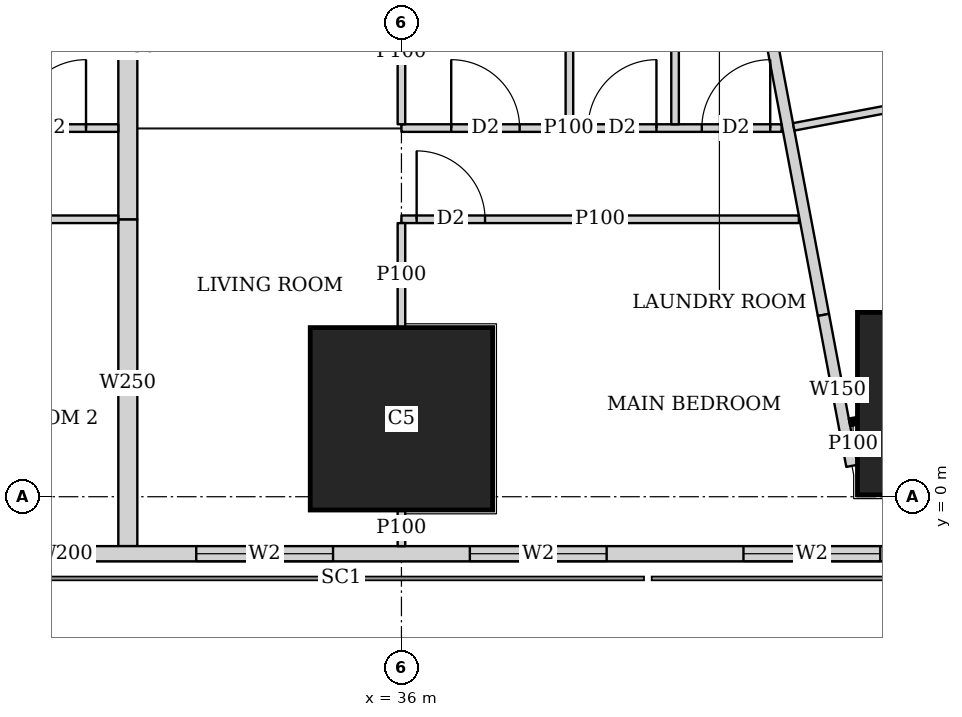
"""IFC4 building model, lengths in metres.
Left out: names, types, materials, properties, quantities, classifications, styles, units other than length and angle.
Written with IfcOpenShell. Run it as: python <this file> out.ifc"""

import sys

from ifc_helpers import new_model, si_unit, direction, frame, frame_2d, origin, origin_2d, place, context, subcontext, project, spatial, rectangle, extrude, element, fill, save


model = new_model("IFC4")
c1 = context("Model", 3, precision=1e-05, world=origin(), true_north=direction((0.0, 1.0)))
c2 = subcontext(c1, "Body", "Model", "MODEL_VIEW")
j1 = project(units=[si_unit("LENGTHUNIT", "METRE"), si_unit("PLANEANGLEUNIT", "RADIAN")], contexts=[c1])
p1 = place(None, origin())
s1 = spatial("IfcSite", under=j1, at=p1, CompositionType="ELEMENT")
p2 = place(p1, origin())
s2 = spatial("IfcBuilding", under=s1, at=p2, CompositionType="ELEMENT")
p3 = place(p2, frame((0.0, 0.0, 242.45)))
s3 = spatial("IfcBuildingStorey", under=s2, at=p3, CompositionType="ELEMENT", Elevation=242.45)
for number, where, z_axis, x_axis in (
    (1, (36.0, 1.025, 0.0), (0.0, 0.0, 1.0), (1.0, 0.0, 0.0)),
    (2, (43.2, 1.225, 0.0), (0.0, 0.0, 1.0), (1.0, 0.0, 0.0)),
):
    element("IfcColumn", number, at=place(p3, frame(where, z_axis=z_axis, x_axis=x_axis)), inside=s3, PredefinedType="COLUMN", context=c2, shape_type="SweptSolid", body=[
        extrude(rectangle(XDim=2.4, YDim=2.4, at=origin_2d()), origin(), (0.0, 0.0, 1.0), 3.75),
    ])
p4 = place(p3, frame((14.563, -0.75, 0.0), z_axis=(0.0, 0.0, 1.0), x_axis=(1.0, 0.0, 0.0)))
e3 = element("IfcWall", 3, at=p4, inside=s3, PredefinedType="SOLIDWALL", context=c2, shape_type="SweptSolid", body=[
    extrude(rectangle(XDim=33.228, YDim=0.2, at=frame_2d((16.614, 0.0))), origin(), (0.0, 0.0, 1.0), 3.45),
])
p5 = place(p4, frame((2.319, 0.0, 0.9)))
e4 = element("IfcOpeningElement", 4, at=p5, cuts=e3, PredefinedType="OPENING", context=c2, shape_type="SweptSolid", body=[
    extrude(rectangle(XDim=2.4, YDim=1.5, at=frame_2d((1.2, 0.75))), frame((0.0, 0.11, 0.0), z_axis=(0.0, -1.0, 0.0), x_axis=(1.0, 0.0, 0.0)), (0.0, 0.0, 1.0), 0.22),
])
p6 = place(p4, frame((7.937, 0.0, 0.9)))
e5 = element("IfcOpeningElement", 5, at=p6, cuts=e3, PredefinedType="OPENING", context=c2, shape_type="SweptSolid", body=[
    extrude(rectangle(XDim=1.8, YDim=1.5, at=frame_2d((0.9, 0.75))), frame((0.0, 0.11, 0.0), z_axis=(0.0, -1.0, 0.0), x_axis=(1.0, 0.0, 0.0)), (0.0, 0.0, 1.0), 0.22),
])
p7 = place(p4, frame((11.537, 0.0, 0.9)))
e6 = element("IfcOpeningElement", 6, at=p7, cuts=e3, PredefinedType="OPENING", context=c2, shape_type="SweptSolid", body=[
    extrude(rectangle(XDim=1.8, YDim=1.5, at=frame_2d((0.9, 0.75))), frame((0.0, 0.11, 0.0), z_axis=(0.0, -1.0, 0.0), x_axis=(1.0, 0.0, 0.0)), (0.0, 0.0, 1.0), 0.22),
])
p8 = place(p4, frame((15.137, 0.0, 0.9)))
e7 = element("IfcOpeningElement", 7, at=p8, cuts=e3, PredefinedType="OPENING", context=c2, shape_type="SweptSolid", body=[
    extrude(rectangle(XDim=1.8, YDim=1.5, at=frame_2d((0.9, 0.75))), frame((0.0, 0.11, 0.0), z_axis=(0.0, -1.0, 0.0), x_axis=(1.0, 0.0, 0.0)), (0.0, 0.0, 1.0), 0.22),
])
p9 = place(p4, frame((18.737, 0.0, 0.9)))
e8 = element("IfcOpeningElement", 8, at=p9, cuts=e3, PredefinedType="OPENING", context=c2, shape_type="SweptSolid", body=[
    extrude(rectangle(XDim=1.8, YDim=1.5, at=frame_2d((0.9, 0.75))), frame((0.0, 0.11, 0.0), z_axis=(0.0, -1.0, 0.0), x_axis=(1.0, 0.0, 0.0)), (0.0, 0.0, 1.0), 0.22),
])
p10 = place(p4, frame((22.337, 0.0, 0.9)))
e9 = element("IfcOpeningElement", 9, at=p10, cuts=e3, PredefinedType="OPENING", context=c2, shape_type="SweptSolid", body=[
    extrude(rectangle(XDim=1.8, YDim=1.5, at=frame_2d((0.9, 0.75))), frame((0.0, 0.11, 0.0), z_axis=(0.0, -1.0, 0.0), x_axis=(1.0, 0.0, 0.0)), (0.0, 0.0, 1.0), 0.22),
])
p11 = place(p4, frame((25.937, 0.0, 0.9)))
e10 = element("IfcOpeningElement", 10, at=p11, cuts=e3, PredefinedType="OPENING", context=c2, shape_type="SweptSolid", body=[
    extrude(rectangle(XDim=1.8, YDim=1.5, at=frame_2d((0.9, 0.75))), frame((0.0, 0.11, 0.0), z_axis=(0.0, -1.0, 0.0), x_axis=(1.0, 0.0, 0.0)), (0.0, 0.0, 1.0), 0.22),
])
p12 = place(p3, frame((33.933, 42.73, 0.0), z_axis=(0.0, 0.0, 1.0), x_axis=(0.185595417643, -0.982626246825, 0.0)))
e11 = element("IfcWall", 11, at=p12, inside=s3, PredefinedType="SOLIDWALL", context=c2, shape_type="SweptSolid", body=[
    extrude(rectangle(XDim=41.051, YDim=0.15, at=frame_2d((20.525, 0.0))), origin(), (0.0, 0.0, 1.0), 2.45),
])
p13 = place(p12, frame((12.266, 0.0, 0.0)))
e12 = element("IfcOpeningElement", 12, at=p13, cuts=e11, PredefinedType="OPENING", context=c2, shape_type="SweptSolid", body=[
    extrude(rectangle(XDim=1.0, YDim=2.1, at=frame_2d((0.5, 1.05))), frame((0.0, 0.085, 0.0), z_axis=(0.0, -1.0, 0.0), x_axis=(1.0, 0.0, 0.0)), (0.0, 0.0, 1.0), 0.17),
])
p14 = place(p12, frame((16.082, 0.0, 0.0)))
e13 = element("IfcOpeningElement", 13, at=p14, cuts=e11, PredefinedType="OPENING", context=c2, shape_type="SweptSolid", body=[
    extrude(rectangle(XDim=1.0, YDim=2.1, at=frame_2d((0.5, 1.05))), frame((0.0, 0.085, 0.0), z_axis=(0.0, -1.0, 0.0), x_axis=(1.0, 0.0, 0.0)), (0.0, 0.0, 1.0), 0.17),
])
p15 = place(p12, frame((30.862, 0.0, 0.0)))
e14 = element("IfcOpeningElement", 14, at=p15, cuts=e11, PredefinedType="OPENING", context=c2, shape_type="SweptSolid", body=[
    extrude(rectangle(XDim=1.0, YDim=2.1, at=frame_2d((0.5, 1.05))), frame((0.0, 0.085, 0.0), z_axis=(0.0, -1.0, 0.0), x_axis=(1.0, 0.0, 0.0)), (0.0, 0.0, 1.0), 0.17),
])
p16 = place(p3, frame((41.552, 2.392, 0.0), z_axis=(0.0, 0.0, 1.0), x_axis=(0.185535500323, -0.982637561932, 0.0)))
e15 = element("IfcWall", 15, at=p16, inside=s3, PredefinedType="SOLIDWALL", context=c2, shape_type="SweptSolid", body=[
    extrude(rectangle(XDim=2.021, YDim=0.15, at=frame_2d((1.011, 0.0))), origin(), (0.0, 0.0, 1.0), 2.0),
])
p17 = place(p3, frame((32.275, 3.65, 0.0), z_axis=(0.0, 0.0, 1.0), x_axis=(-1.0, 0.0, 0.0)))
e16 = element("IfcWall", 16, at=p17, inside=s3, PredefinedType="PARTITIONING", context=c2, shape_type="SweptSolid", body=[
    extrude(rectangle(XDim=7.075, YDim=0.1, at=frame_2d((3.538, 0.0))), origin(), (0.0, 0.0, 1.0), 3.45),
])
p18 = place(p17, frame((5.975, 0.0, 0.0)))
e17 = element("IfcOpeningElement", 17, at=p18, cuts=e16, PredefinedType="OPENING", context=c2, shape_type="SweptSolid", body=[
    extrude(rectangle(XDim=0.9, YDim=2.1, at=frame_2d((0.45, 1.05))), frame((0.0, 0.06, 0.0), z_axis=(0.0, -1.0, 0.0), x_axis=(1.0, 0.0, 0.0)), (0.0, 0.0, 1.0), 0.12),
])
p19 = place(p17, frame((1.35, 0.0, 0.0)))
e18 = element("IfcOpeningElement", 18, at=p19, cuts=e16, PredefinedType="OPENING", context=c2, shape_type="SweptSolid", body=[
    extrude(rectangle(XDim=0.9, YDim=2.1, at=frame_2d((0.45, 1.05))), frame((0.0, 0.06, 0.0), z_axis=(0.0, -1.0, 0.0), x_axis=(1.0, 0.0, 0.0)), (0.0, 0.0, 1.0), 0.12),
])
p20 = place(p3, frame((32.275, 4.85, 0.0), z_axis=(0.0, 0.0, 1.0), x_axis=(-1.0, 0.0, 0.0)))
e19 = element("IfcWall", 19, at=p20, inside=s3, PredefinedType="PARTITIONING", context=c2, shape_type="SweptSolid", body=[
    extrude(rectangle(XDim=7.075, YDim=0.1, at=frame_2d((3.538, 0.0))), origin(), (0.0, 0.0, 1.0), 3.45),
])
p21 = place(p20, frame((5.52, 0.0, 0.0)))
e20 = element("IfcOpeningElement", 20, at=p21, cuts=e19, PredefinedType="OPENING", context=c2, shape_type="SweptSolid", body=[
    extrude(rectangle(XDim=0.9, YDim=2.1, at=frame_2d((0.45, 1.05))), frame((0.0, 0.06, 0.0), z_axis=(0.0, -1.0, 0.0), x_axis=(1.0, 0.0, 0.0)), (0.0, 0.0, 1.0), 0.12),
])
p22 = place(p20, frame((2.225, 0.0, 0.0)))
e21 = element("IfcOpeningElement", 21, at=p22, cuts=e19, PredefinedType="OPENING", context=c2, shape_type="SweptSolid", body=[
    extrude(rectangle(XDim=0.9, YDim=2.1, at=frame_2d((0.45, 1.05))), frame((0.0, 0.06, 0.0), z_axis=(0.0, -1.0, 0.0), x_axis=(1.0, 0.0, 0.0)), (0.0, 0.0, 1.0), 0.12),
])
p23 = place(p20, frame((3.72, 0.0, 0.0)))
e22 = element("IfcOpeningElement", 22, at=p23, cuts=e19, PredefinedType="OPENING", context=c2, shape_type="SweptSolid", body=[
    extrude(rectangle(XDim=0.9, YDim=2.1, at=frame_2d((0.45, 1.05))), frame((0.0, 0.06, 0.0), z_axis=(0.0, -1.0, 0.0), x_axis=(1.0, 0.0, 0.0)), (0.0, 0.0, 1.0), 0.12),
])
p24 = place(p20, frame((0.425, 0.0, 0.0)))
e23 = element("IfcOpeningElement", 23, at=p24, cuts=e19, PredefinedType="OPENING", context=c2, shape_type="SweptSolid", body=[
    extrude(rectangle(XDim=0.9, YDim=2.1, at=frame_2d((0.45, 1.05))), frame((0.0, 0.06, 0.0), z_axis=(0.0, -1.0, 0.0), x_axis=(1.0, 0.0, 0.0)), (0.0, 0.0, 1.0), 0.12),
])
p25 = place(p3, frame((41.229, 3.65, 0.0), z_axis=(0.0, 0.0, 1.0), x_axis=(-1.0, 0.0, 0.0)))
e24 = element("IfcWall", 24, at=p25, inside=s3, PredefinedType="PARTITIONING", context=c2, shape_type="SweptSolid", body=[
    extrude(rectangle(XDim=5.229, YDim=0.1, at=frame_2d((2.615, 0.0))), origin(), (0.0, 0.0, 1.0), 3.45),
])
p26 = place(p25, frame((4.129, 0.0, 0.0)))
e25 = element("IfcOpeningElement", 25, at=p26, cuts=e24, PredefinedType="OPENING", context=c2, shape_type="SweptSolid", body=[
    extrude(rectangle(XDim=0.9, YDim=2.1, at=frame_2d((0.45, 1.05))), frame((0.0, 0.06, 0.0), z_axis=(0.0, -1.0, 0.0), x_axis=(1.0, 0.0, 0.0)), (0.0, 0.0, 1.0), 0.12),
])
p27 = place(p3, frame((41.002, 4.85, 0.0), z_axis=(0.0, 0.0, 1.0), x_axis=(-1.0, 0.0, 0.0)))
e26 = element("IfcWall", 26, at=p27, inside=s3, PredefinedType="PARTITIONING", context=c2, shape_type="SweptSolid", body=[
    extrude(rectangle(XDim=5.002, YDim=0.1, at=frame_2d((2.501, 0.0))), origin(), (0.0, 0.0, 1.0), 3.45),
])
p28 = place(p27, frame((3.447, 0.0, 0.0)))
e27 = element("IfcOpeningElement", 27, at=p28, cuts=e26, PredefinedType="OPENING", context=c2, shape_type="SweptSolid", body=[
    extrude(rectangle(XDim=0.9, YDim=2.1, at=frame_2d((0.45, 1.05))), frame((0.0, 0.06, 0.0), z_axis=(0.0, -1.0, 0.0), x_axis=(1.0, 0.0, 0.0)), (0.0, 0.0, 1.0), 0.12),
])
p29 = place(p27, frame((0.15, 0.0, 0.0)))
e28 = element("IfcOpeningElement", 28, at=p29, cuts=e26, PredefinedType="OPENING", context=c2, shape_type="SweptSolid", body=[
    extrude(rectangle(XDim=0.9, YDim=2.1, at=frame_2d((0.45, 1.05))), frame((0.0, 0.06, 0.0), z_axis=(0.0, -1.0, 0.0), x_axis=(1.0, 0.0, 0.0)), (0.0, 0.0, 1.0), 0.12),
])
p30 = place(p27, frame((1.647, 0.0, 0.0)))
e29 = element("IfcOpeningElement", 29, at=p30, cuts=e26, PredefinedType="OPENING", context=c2, shape_type="SweptSolid", body=[
    extrude(rectangle(XDim=0.9, YDim=2.1, at=frame_2d((0.45, 1.05))), frame((0.0, 0.06, 0.0), z_axis=(0.0, -1.0, 0.0), x_axis=(1.0, 0.0, 0.0)), (0.0, 0.0, 1.0), 0.12),
])
p31 = place(p3, frame((36.0, -0.65, 0.0), z_axis=(0.0, 0.0, 1.0), x_axis=(0.0, 1.0, 0.0)))
e30 = element("IfcWall", 30, at=p31, inside=s3, PredefinedType="PARTITIONING", context=c2, shape_type="SweptSolid", body=[
    extrude(rectangle(XDim=0.474, YDim=0.1, at=frame_2d((0.237, 0.0))), origin(), (0.0, 0.0, 1.0), 3.45),
])
p32 = place(p3, frame((36.0, 2.226, 0.0), z_axis=(0.0, 0.0, 1.0), x_axis=(0.0, 1.0, 0.0)))
e31 = element("IfcWall", 31, at=p32, inside=s3, PredefinedType="PARTITIONING", context=c2, shape_type="SweptSolid", body=[
    extrude(rectangle(XDim=1.374, YDim=0.1, at=frame_2d((0.687, 0.0))), origin(), (0.0, 0.0, 1.0), 3.45),
])
p33 = place(p3, frame((36.0, 4.9, 0.0), z_axis=(0.0, 0.0, 1.0), x_axis=(0.0, 1.0, 0.0)))
e32 = element("IfcWall", 32, at=p33, inside=s3, PredefinedType="PARTITIONING", context=c2, shape_type="SweptSolid", body=[
    extrude(rectangle(XDim=1.899, YDim=0.1, at=frame_2d((0.95, 0.0))), origin(), (0.0, 0.0, 1.0), 3.45),
])
for number, where, z_axis, x_axis in (
    (33, (39.6, 4.9, 0.0), (0.0, 0.0, 1.0), (0.0, 1.0, 0.0)),
    (34, (38.21, 4.9, 0.0), (0.0, 0.0, 1.0), (0.0, 1.0, 0.0)),
):
    element("IfcWall", number, at=place(p3, frame(where, z_axis=z_axis, x_axis=x_axis)), inside=s3, PredefinedType="PARTITIONING", context=c2, shape_type="SweptSolid", body=[
        extrude(rectangle(XDim=3.275, YDim=0.1, at=frame_2d((1.638, 0.0))), origin(), (0.0, 0.0, 1.0), 3.45),
    ])
p34 = place(p3, frame((32.4, -0.65, 0.0), z_axis=(0.0, 0.0, 1.0), x_axis=(0.0, 1.0, 0.0)))
e35 = element("IfcWall", 35, at=p34, inside=s3, PredefinedType="SOLIDWALL", context=c2, shape_type="SweptSolid", body=[
    extrude(rectangle(XDim=4.3, YDim=0.25, at=frame_2d((2.15, 0.0))), origin(), (0.0, 0.0, 1.0), 2.0),
])
p35 = place(p3, frame((32.4, 3.65, 0.0), z_axis=(0.0, 0.0, 1.0), x_axis=(0.0, 1.0, 0.0)))
e36 = element("IfcWall", 36, at=p35, inside=s3, PredefinedType="SOLIDWALL", context=c2, shape_type="SweptSolid", body=[
    extrude(rectangle(XDim=4.525, YDim=0.25, at=frame_2d((2.263, 0.0))), origin(), (0.0, 0.0, 1.0), 3.45),
])
p36 = place(p3, frame((41.99, 0.997, 0.0), z_axis=(0.0, 0.0, 1.0), x_axis=(-0.982382747416, -0.186880008506, 0.0)))
e37 = element("IfcWall", 37, at=p36, inside=s3, PredefinedType="PARTITIONING", context=c2, shape_type="SweptSolid", body=[
    extrude(rectangle(XDim=0.097, YDim=0.1, at=frame_2d((0.048, 0.0))), origin(), (0.0, 0.0, 1.0), 2.0),
])
p37 = place(p3, frame((44.379, 5.474, 0.0), z_axis=(0.0, 0.0, 1.0), x_axis=(-0.982607026909, -0.185697147715, 0.0)))
e38 = element("IfcWall", 38, at=p37, inside=s3, PredefinedType="PARTITIONING", context=c2, shape_type="SweptSolid", body=[
    extrude(rectangle(XDim=3.275, YDim=0.1, at=frame_2d((1.637, 0.0))), origin(), (0.0, 0.0, 1.0), 3.45),
])
p38 = place(p8, origin())
e39 = element("IfcWindow", 39, at=p38, inside=s3, PartitioningType="SINGLE_PANEL", PredefinedType="WINDOW", context=c2, shape_type="SweptSolid", body=[
    extrude(rectangle(XDim=1.8, YDim=1.5, at=frame_2d((0.9, 0.75))), frame((0.0, 0.03, 0.0), z_axis=(0.0, -1.0, 0.0), x_axis=(1.0, 0.0, 0.0)), (0.0, 0.0, 1.0), 0.06),
])
fill(e7, e39)
p39 = place(p9, origin())
e40 = element("IfcWindow", 40, at=p39, inside=s3, PartitioningType="SINGLE_PANEL", PredefinedType="WINDOW", context=c2, shape_type="SweptSolid", body=[
    extrude(rectangle(XDim=1.8, YDim=1.5, at=frame_2d((0.9, 0.75))), frame((0.0, 0.03, 0.0), z_axis=(0.0, -1.0, 0.0), x_axis=(1.0, 0.0, 0.0)), (0.0, 0.0, 1.0), 0.06),
])
fill(e8, e40)
p40 = place(p10, origin())
e41 = element("IfcWindow", 41, at=p40, inside=s3, PartitioningType="SINGLE_PANEL", PredefinedType="WINDOW", context=c2, shape_type="SweptSolid", body=[
    extrude(rectangle(XDim=1.8, YDim=1.5, at=frame_2d((0.9, 0.75))), frame((0.0, 0.03, 0.0), z_axis=(0.0, -1.0, 0.0), x_axis=(1.0, 0.0, 0.0)), (0.0, 0.0, 1.0), 0.06),
])
fill(e9, e41)
p41 = place(p11, origin())
e42 = element("IfcWindow", 42, at=p41, inside=s3, PartitioningType="SINGLE_PANEL", PredefinedType="WINDOW", context=c2, shape_type="SweptSolid", body=[
    extrude(rectangle(XDim=1.8, YDim=1.5, at=frame_2d((0.9, 0.75))), frame((0.0, 0.03, 0.0), z_axis=(0.0, -1.0, 0.0), x_axis=(1.0, 0.0, 0.0)), (0.0, 0.0, 1.0), 0.06),
])
fill(e10, e42)
p42 = place(p24, origin())
e43 = element("IfcDoor", 43, at=p42, inside=s3, OperationType="SINGLE_SWING_RIGHT", PredefinedType="DOOR", context=c2, shape_type="SweptSolid", body=[
    extrude(rectangle(XDim=0.9, YDim=2.1, at=frame_2d((0.45, 1.05))), frame((0.0, 0.025, 0.0), z_axis=(0.0, -1.0, 0.0), x_axis=(1.0, 0.0, 0.0)), (0.0, 0.0, 1.0), 0.05),
])
fill(e23, e43)
p43 = place(p26, origin())
e44 = element("IfcDoor", 44, at=p43, inside=s3, OperationType="SINGLE_SWING_LEFT", PredefinedType="DOOR", context=c2, shape_type="SweptSolid", body=[
    extrude(rectangle(XDim=0.9, YDim=2.1, at=frame_2d((0.45, 1.05))), frame((0.0, 0.025, 0.0), z_axis=(0.0, -1.0, 0.0), x_axis=(1.0, 0.0, 0.0)), (0.0, 0.0, 1.0), 0.05),
])
fill(e25, e44)
p44 = place(p28, origin())
e45 = element("IfcDoor", 45, at=p44, inside=s3, OperationType="SINGLE_SWING_LEFT", PredefinedType="DOOR", context=c2, shape_type="SweptSolid", body=[
    extrude(rectangle(XDim=0.9, YDim=2.1, at=frame_2d((0.45, 1.05))), frame((0.0, 0.025, 0.0), z_axis=(0.0, -1.0, 0.0), x_axis=(1.0, 0.0, 0.0)), (0.0, 0.0, 1.0), 0.05),
])
fill(e27, e45)
p45 = place(p29, origin())
e46 = element("IfcDoor", 46, at=p45, inside=s3, OperationType="SINGLE_SWING_RIGHT", PredefinedType="DOOR", context=c2, shape_type="SweptSolid", body=[
    extrude(rectangle(XDim=0.9, YDim=2.1, at=frame_2d((0.45, 1.05))), frame((0.0, 0.025, 0.0), z_axis=(0.0, -1.0, 0.0), x_axis=(1.0, 0.0, 0.0)), (0.0, 0.0, 1.0), 0.05),
])
fill(e28, e46)
p46 = place(p30, origin())
e47 = element("IfcDoor", 47, at=p46, inside=s3, OperationType="SINGLE_SWING_RIGHT", PredefinedType="DOOR", context=c2, shape_type="SweptSolid", body=[
    extrude(rectangle(XDim=0.9, YDim=2.1, at=frame_2d((0.45, 1.05))), frame((0.0, 0.025, 0.0), z_axis=(0.0, -1.0, 0.0), x_axis=(1.0, 0.0, 0.0)), (0.0, 0.0, 1.0), 0.05),
])
fill(e29, e47)
save(model, sys.argv[1])
